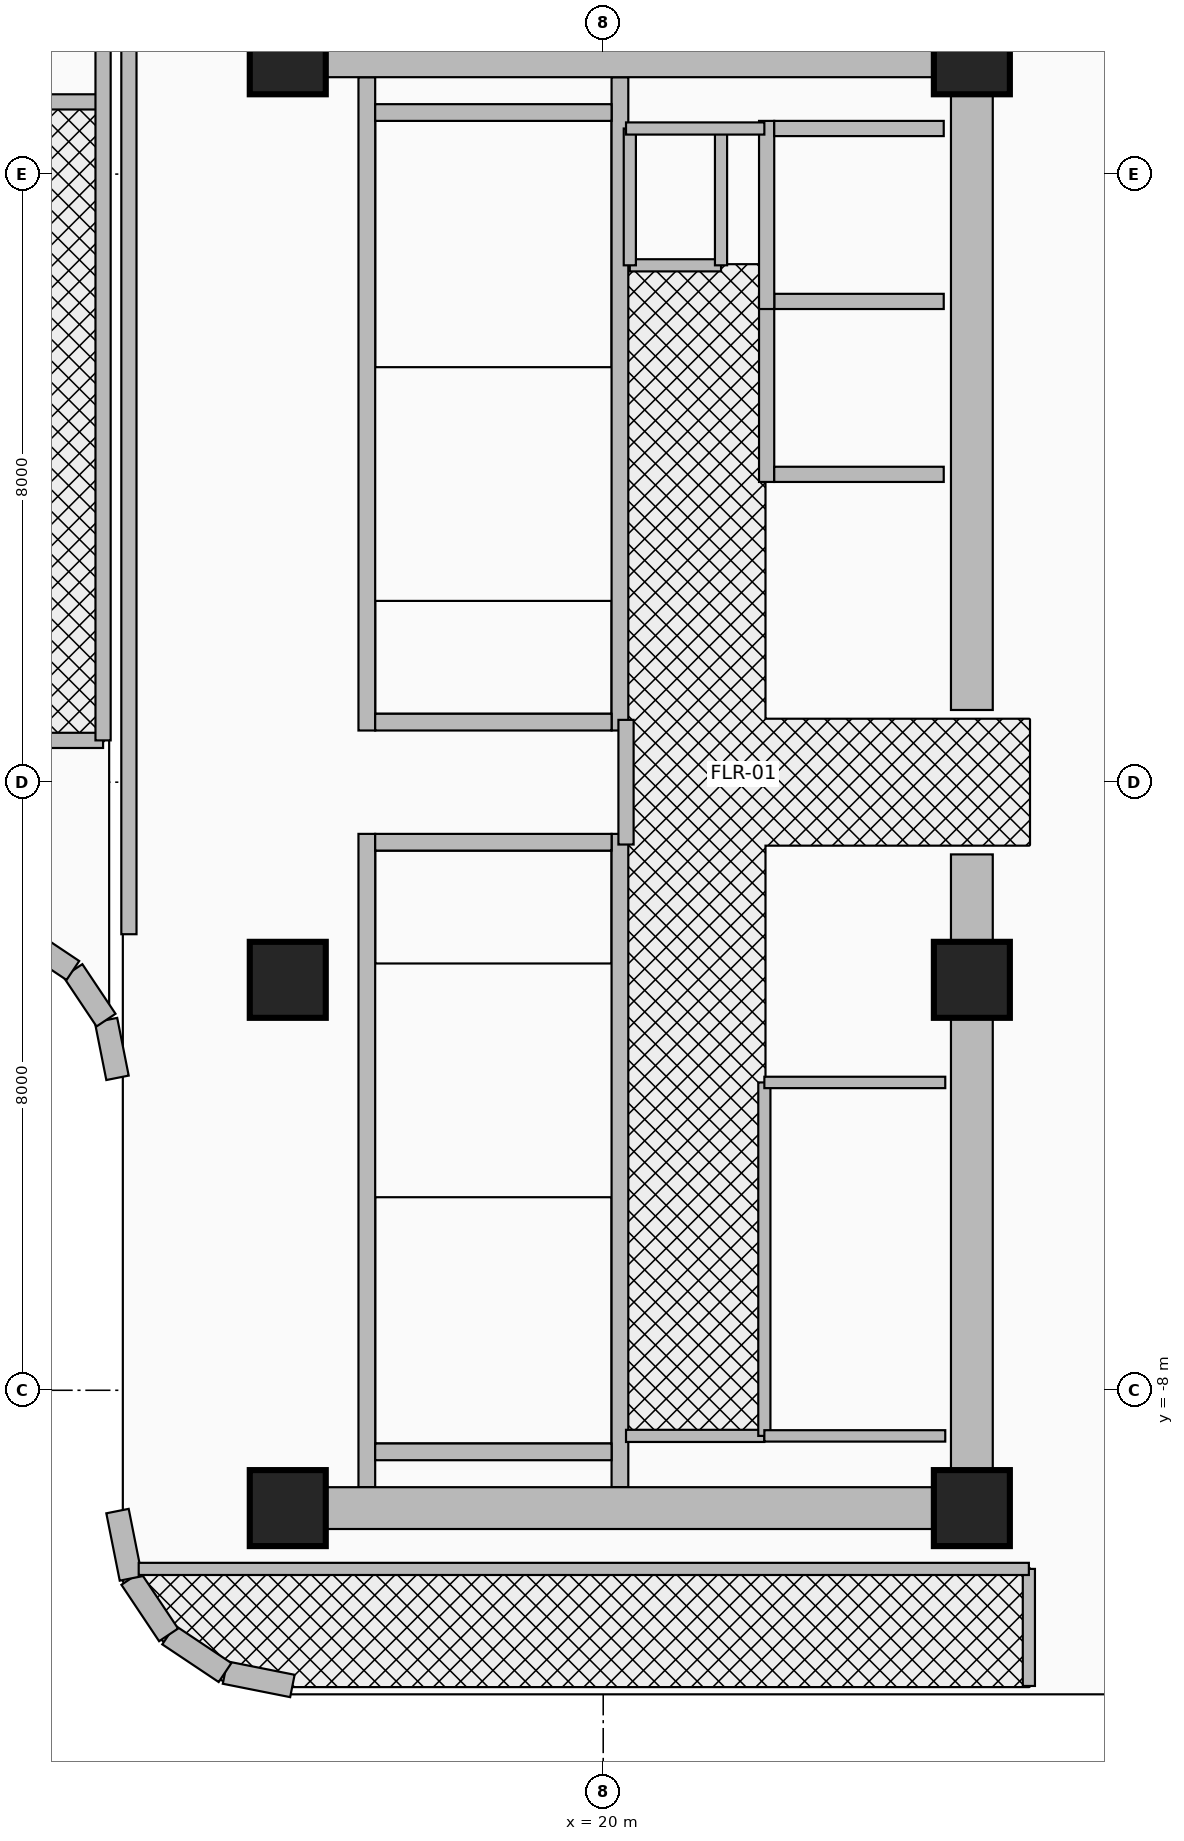
"""IFC4 building model, lengths in metres.
Left out: names, types, materials, properties, quantities, classifications, styles, units other than length and angle.
Written with IfcOpenShell. Run it as: python <this file> out.ifc"""

import sys

from ifc_helpers import new_model, si_unit, direction, frame, frame_2d, origin, origin_2d, place, context, subcontext, project, spatial, rectangle, extrude, source, transform, mapped, element, fill, save


model = new_model("IFC4")
c1 = context("Model", 3, precision=1e-05, world=origin(), true_north=direction((0.0, 1.0)))
c2 = subcontext(c1, "Body", "Model", "MODEL_VIEW")
j1 = project(units=[si_unit("LENGTHUNIT", "METRE"), si_unit("PLANEANGLEUNIT", "RADIAN")], contexts=[c1])
p1 = place(None, origin())
s1 = spatial("IfcSite", under=j1, at=p1, CompositionType="ELEMENT")
p2 = place(p1, origin())
s2 = spatial("IfcBuilding", under=s1, at=p2, CompositionType="ELEMENT")
p3 = place(p2, frame((0.0, 0.0, 172.3)))
s3 = spatial("IfcBuildingStorey", under=s2, at=p3, CompositionType="ELEMENT", Elevation=172.3)
for number, where, z_axis, x_axis in (
    (1, (16.89, 0.68, 0.0), (0.0, 0.0, 1.0), (0.0, 1.0, 0.0)),
    (2, (20.22, 0.68, 0.0), (0.0, 0.0, 1.0), (0.0, 1.0, 0.0)),
):
    element("IfcWall", number, at=place(p3, frame(where, z_axis=z_axis, x_axis=x_axis)), inside=s3, PredefinedType="SHEAR", context=c2, shape_type="SweptSolid", body=[
        extrude(rectangle(XDim=8.595, YDim=0.22, at=frame_2d((4.297, 0.0))), origin(), (0.0, 0.0, 1.0), 3.93),
    ])
p4 = place(p3, frame((17.0, 0.79, 0.0), z_axis=(0.0, 0.0, 1.0), x_axis=(1.0, 0.0, 0.0)))
e3 = element("IfcWall", 3, at=p4, inside=s3, PredefinedType="SHEAR", context=c2, shape_type="SweptSolid", body=[
    extrude(rectangle(XDim=3.11, YDim=0.22, at=frame_2d((1.555, 0.0))), origin(), (0.0, 0.0, 1.0), 3.93),
])
p5 = place(p4, frame((0.95, 0.0, 0.0)))
e4 = element("IfcOpeningElement", 4, at=p5, cuts=e3, PredefinedType="OPENING", context=c2, shape_type="SweptSolid", body=[
    extrude(rectangle(XDim=1.1, YDim=2.15, at=frame_2d((0.55, 1.075))), frame((0.0, 0.125, 0.0), z_axis=(0.0, -1.0, 0.0), x_axis=(1.0, 0.0, 0.0)), (0.0, 0.0, 1.0), 0.25),
])
p6 = place(p3, frame((17.0, 8.81, 0.0), z_axis=(0.0, 0.0, 1.0), x_axis=(1.0, 0.0, 0.0)))
e5 = element("IfcWall", 5, at=p6, inside=s3, PredefinedType="SHEAR", context=c2, shape_type="SweptSolid", body=[
    extrude(rectangle(XDim=3.11, YDim=0.22, at=frame_2d((1.555, 0.0))), origin(), (0.0, 0.0, 1.0), 3.93),
])
for number, where, z_axis, x_axis in (
    (6, (16.89, -9.275, 0.0), (0.0, 0.0, 1.0), (0.0, 1.0, 0.0)),
    (7, (20.22, -9.275, 0.0), (0.0, 0.0, 1.0), (0.0, 1.0, 0.0)),
):
    element("IfcWall", number, at=place(p3, frame(where, z_axis=z_axis, x_axis=x_axis)), inside=s3, PredefinedType="SHEAR", context=c2, shape_type="SweptSolid", body=[
        extrude(rectangle(XDim=8.595, YDim=0.22, at=frame_2d((4.297, 0.0))), origin(), (0.0, 0.0, 1.0), 3.93),
    ])
p7 = place(p3, frame((17.0, -8.81, 0.0), z_axis=(0.0, 0.0, 1.0), x_axis=(1.0, 0.0, 0.0)))
e8 = element("IfcWall", 8, at=p7, inside=s3, PredefinedType="SHEAR", context=c2, shape_type="SweptSolid", body=[
    extrude(rectangle(XDim=3.11, YDim=0.22, at=frame_2d((1.555, 0.0))), origin(), (0.0, 0.0, 1.0), 3.93),
])
p8 = place(p3, frame((17.0, -0.79, 0.0), z_axis=(0.0, 0.0, 1.0), x_axis=(1.0, 0.0, 0.0)))
e9 = element("IfcWall", 9, at=p8, inside=s3, PredefinedType="SHEAR", context=c2, shape_type="SweptSolid", body=[
    extrude(rectangle(XDim=3.11, YDim=0.22, at=frame_2d((1.555, 0.0))), origin(), (0.0, 0.0, 1.0), 3.93),
])
p9 = place(p8, frame((0.95, 0.0, 0.0)))
e10 = element("IfcOpeningElement", 10, at=p9, cuts=e9, PredefinedType="OPENING", context=c2, shape_type="SweptSolid", body=[
    extrude(rectangle(XDim=1.1, YDim=2.15, at=frame_2d((0.55, 1.075))), frame((0.0, 0.125, 0.0), z_axis=(0.0, -1.0, 0.0), x_axis=(1.0, 0.0, 0.0)), (0.0, 0.0, 1.0), 0.25),
])
for number, where, z_axis, x_axis in (
    (11, (24.85, -9.825, 0.0), (0.0, 0.0, 1.0), (0.0, 1.0, 0.0)),
    (12, (24.85, 0.95, 0.0), (0.0, 0.0, 1.0), (0.0, 1.0, 0.0)),
):
    element("IfcWall", number, at=place(p3, frame(where, z_axis=z_axis, x_axis=x_axis)), inside=s3, PredefinedType="SHEAR", context=c2, shape_type="SweptSolid", body=[
        extrude(rectangle(XDim=8.875, YDim=0.55, at=frame_2d((4.438, 0.0))), origin(), (0.0, 0.0, 1.0), 3.93),
    ])
for number, where, z_axis, x_axis in (
    (13, (15.85, 9.55, 0.0), (0.0, 0.0, 1.0), (1.0, 0.0, 0.0)),
    (14, (15.85, -9.55, 0.0), (0.0, 0.0, 1.0), (1.0, 0.0, 0.0)),
):
    element("IfcWall", number, at=place(p3, frame(where, z_axis=z_axis, x_axis=x_axis)), inside=s3, PredefinedType="SHEAR", context=c2, shape_type="SweptSolid", body=[
        extrude(rectangle(XDim=9.0, YDim=0.55, at=frame_2d((4.5, 0.0))), origin(), (0.0, 0.0, 1.0), 3.93),
    ])
m1 = source(origin(), c2, "Body", "SweptSolid", [
    extrude(rectangle(XDim=1.0, YDim=1.0, at=origin_2d()), origin(), (0.0, 0.0, 1.0), 4.25),
])
for number, where, z_axis, x_axis in (
    (15, (15.85, -9.55, 0.0), (0.0, 0.0, 1.0), (1.0, 0.0, 0.0)),
    (16, (24.85, -9.55, 0.0), (0.0, 0.0, 1.0), (1.0, 0.0, 0.0)),
    (17, (15.85, -2.6, 0.0), (0.0, 0.0, 1.0), (1.0, 0.0, 0.0)),
    (18, (24.85, -2.6, 0.0), (0.0, 0.0, 1.0), (1.0, 0.0, 0.0)),
    (19, (15.85, 9.55, 0.0), (0.0, 0.0, 1.0), (1.0, 0.0, 0.0)),
    (20, (24.85, 9.55, 0.0), (0.0, 0.0, 1.0), (1.0, 0.0, 0.0)),
):
    element("IfcColumn", number, at=place(p3, frame(where, z_axis=z_axis, x_axis=x_axis)), inside=s3, PredefinedType="COLUMN", context=c2, shape_type="MappedRepresentation", body=[
        mapped(m1, transform((0.0, 0.0, 0.0), x_axis=(1.0, 0.0, 0.0), y_axis=(0.0, 1.0, 0.0), z_axis=(0.0, 0.0, 1.0), scale=1.0)),
    ])
p10 = place(p3, frame((15.911, -11.89, 0.0), z_axis=(0.0, 0.0, 1.0), x_axis=(-0.980798241101, 0.195025152871, 0.0)))
e21 = element("IfcWall", 21, at=p10, inside=s3, PredefinedType="SOLIDWALL", context=c2, shape_type="SweptSolid", body=[
    extrude(rectangle(XDim=0.904, YDim=0.3, at=frame_2d((0.452, 0.0))), origin(), (0.0, 0.0, 1.0), 3.93),
])
for number, where, z_axis, x_axis in (
    (22, (15.024, -11.714, 0.0), (0.0, 0.0, 1.0), (-0.832, 0.556, 0.0)),
    (23, (14.282, -11.218, 0.0), (0.0, 0.0, 1.0), (-0.556, 0.832, 0.0)),
):
    element("IfcWall", number, at=place(p3, frame(where, z_axis=z_axis, x_axis=x_axis)), inside=s3, PredefinedType="SOLIDWALL", context=c2, shape_type="SweptSolid", body=[
        extrude(rectangle(XDim=0.893, YDim=0.3, at=frame_2d((0.446, 0.0))), origin(), (0.0, 0.0, 1.0), 3.93),
    ])
p11 = place(p3, frame((13.786, -10.476, 0.0), z_axis=(0.0, 0.0, 1.0), x_axis=(-0.195025152871, 0.980798241101, 0.0)))
e24 = element("IfcWall", 24, at=p11, inside=s3, PredefinedType="SOLIDWALL", context=c2, shape_type="SweptSolid", body=[
    extrude(rectangle(XDim=0.904, YDim=0.3, at=frame_2d((0.452, 0.0))), origin(), (0.0, 0.0, 1.0), 3.93),
])
p12 = place(p3, frame((13.61, -3.889, 0.0), z_axis=(0.0, 0.0, 1.0), x_axis=(-0.195206365311, 0.98076219082, 0.0)))
e25 = element("IfcWall", 25, at=p12, inside=s3, PredefinedType="SOLIDWALL", context=c2, shape_type="SweptSolid", body=[
    extrude(rectangle(XDim=0.774, YDim=0.3, at=frame_2d((0.387, 0.0))), origin(), (0.0, 0.0, 1.0), 3.93),
])
p13 = place(p3, frame((13.459, -3.13, 0.0), z_axis=(0.0, 0.0, 1.0), x_axis=(-0.555776307766, 0.831331880615, 0.0)))
e26 = element("IfcWall", 26, at=p13, inside=s3, PredefinedType="SOLIDWALL", context=c2, shape_type="SweptSolid", body=[
    extrude(rectangle(XDim=0.785, YDim=0.3, at=frame_2d((0.393, 0.0))), origin(), (0.0, 0.0, 1.0), 3.93),
])
p14 = place(p3, frame((13.023, -2.477, 0.0), z_axis=(0.0, 0.0, 1.0), x_axis=(-0.831331880615, 0.555776307766, 0.0)))
e27 = element("IfcWall", 27, at=p14, inside=s3, PredefinedType="SOLIDWALL", context=c2, shape_type="SweptSolid", body=[
    extrude(rectangle(XDim=0.785, YDim=0.3, at=frame_2d((0.393, 0.0))), origin(), (0.0, 0.0, 1.0), 2.715),
])
p15 = place(p3, frame((22.15, 3.95, 0.0), z_axis=(0.0, 0.0, 1.0), x_axis=(0.0, 1.0, 0.0)))
e28 = element("IfcWall", 28, at=p15, inside=s3, PredefinedType="MOVABLE", context=c2, shape_type="SweptSolid", body=[
    extrude(rectangle(XDim=2.475, YDim=0.2, at=frame_2d((1.238, 0.0))), origin(), (0.0, 0.0, 1.0), 3.93),
])
p16 = place(p15, frame((0.688, 0.0, 0.0)))
e29 = element("IfcOpeningElement", 29, at=p16, cuts=e28, PredefinedType="OPENING", context=c2, shape_type="SweptSolid", body=[
    extrude(rectangle(XDim=1.1, YDim=2.1, at=frame_2d((0.55, 1.05))), frame((0.0, 0.115, 0.0), z_axis=(0.0, -1.0, 0.0), x_axis=(1.0, 0.0, 0.0)), (0.0, 0.0, 1.0), 0.23),
])
for number, where, z_axis, x_axis in (
    (30, (22.25, 4.05, 0.0), (0.0, 0.0, 1.0), (1.0, 0.0, 0.0)),
    (31, (22.25, 6.325, 0.0), (0.0, 0.0, 1.0), (1.0, 0.0, 0.0)),
):
    element("IfcWall", number, at=place(p3, frame(where, z_axis=z_axis, x_axis=x_axis)), inside=s3, PredefinedType="MOVABLE", context=c2, shape_type="SweptSolid", body=[
        extrude(rectangle(XDim=2.23, YDim=0.2, at=frame_2d((1.115, 0.0))), origin(), (0.0, 0.0, 1.0), 3.93),
    ])
p17 = place(p3, frame((22.15, 6.225, 0.0), z_axis=(0.0, 0.0, 1.0), x_axis=(0.0, 1.0, 0.0)))
e32 = element("IfcWall", 32, at=p17, inside=s3, PredefinedType="MOVABLE", context=c2, shape_type="SweptSolid", body=[
    extrude(rectangle(XDim=2.475, YDim=0.2, at=frame_2d((1.237, 0.0))), origin(), (0.0, 0.0, 1.0), 3.93),
])
p18 = place(p17, frame((0.688, 0.0, 0.0)))
e33 = element("IfcOpeningElement", 33, at=p18, cuts=e32, PredefinedType="OPENING", context=c2, shape_type="SweptSolid", body=[
    extrude(rectangle(XDim=1.1, YDim=2.1, at=frame_2d((0.55, 1.05))), frame((0.0, 0.115, 0.0), z_axis=(0.0, -1.0, 0.0), x_axis=(1.0, 0.0, 0.0)), (0.0, 0.0, 1.0), 0.23),
])
p19 = place(p3, frame((22.25, 8.6, 0.0), z_axis=(0.0, 0.0, 1.0), x_axis=(1.0, 0.0, 0.0)))
e34 = element("IfcWall", 34, at=p19, inside=s3, PredefinedType="MOVABLE", context=c2, shape_type="SweptSolid", body=[
    extrude(rectangle(XDim=2.23, YDim=0.2, at=frame_2d((1.115, 0.0))), origin(), (0.0, 0.0, 1.0), 3.93),
])
p20 = place(p3, frame((20.3, -0.82, 0.0), z_axis=(0.0, 0.0, 1.0), x_axis=(0.0, 1.0, 0.0)))
e35 = element("IfcWall", 35, at=p20, inside=s3, PredefinedType="PARTITIONING", context=c2, shape_type="SweptSolid", body=[
    extrude(rectangle(XDim=1.64, YDim=0.2, at=frame_2d((0.82, 0.0))), origin(), (0.0, 0.0, 1.0), 3.93),
])
p21 = place(p20, frame((0.295, 0.0, 0.0)))
e36 = element("IfcOpeningElement", 36, at=p21, cuts=e35, PredefinedType="OPENING", context=c2, shape_type="SweptSolid", body=[
    extrude(rectangle(XDim=1.05, YDim=2.15, at=frame_2d((0.525, 1.075))), frame((0.0, 0.115, 0.0), z_axis=(0.0, -1.0, 0.0), x_axis=(1.0, 0.0, 0.0)), (0.0, 0.0, 1.0), 0.23),
])
p22 = place(p3, frame((20.35, 6.8, 0.0), z_axis=(0.0, 0.0, 1.0), x_axis=(1.0, 0.0, 0.0)))
e37 = element("IfcWall", 37, at=p22, inside=s3, PredefinedType="PARTITIONING", context=c2, shape_type="SweptSolid", body=[
    extrude(rectangle(XDim=1.2, YDim=0.16, at=frame_2d((0.6, 0.0))), origin(), (0.0, 0.0, 1.0), 3.93),
])
p23 = place(p22, frame((0.175, 0.0, 0.0)))
e38 = element("IfcOpeningElement", 38, at=p23, cuts=e37, PredefinedType="OPENING", context=c2, shape_type="SweptSolid", body=[
    extrude(rectangle(XDim=0.85, YDim=2.05, at=frame_2d((0.425, 1.025))), frame((0.0, 0.095, 0.0), z_axis=(0.0, -1.0, 0.0), x_axis=(1.0, 0.0, 0.0)), (0.0, 0.0, 1.0), 0.19),
])
for number, where, z_axis, x_axis in (
    (39, (21.55, 6.8, 0.0), (0.0, 0.0, 1.0), (0.0, 1.0, 0.0)),
    (40, (20.35, 6.8, 0.0), (0.0, 0.0, 1.0), (0.0, 1.0, 0.0)),
):
    element("IfcWall", number, at=place(p3, frame(where, z_axis=z_axis, x_axis=x_axis)), inside=s3, PredefinedType="PARTITIONING", context=c2, shape_type="SweptSolid", body=[
        extrude(rectangle(XDim=1.8, YDim=0.16, at=frame_2d((0.9, 0.0))), origin(), (0.0, 0.0, 1.0), 3.93),
    ])
for number, where, z_axis, x_axis in (
    (41, (20.3, -8.6, 0.0), (0.0, 0.0, 1.0), (1.0, 0.0, 0.0)),
    (42, (20.3, 8.6, 0.0), (0.0, 0.0, 1.0), (1.0, 0.0, 0.0)),
):
    element("IfcWall", number, at=place(p3, frame(where, z_axis=z_axis, x_axis=x_axis)), inside=s3, PredefinedType="PARTITIONING", context=c2, shape_type="SweptSolid", body=[
        extrude(rectangle(XDim=1.82, YDim=0.16, at=frame_2d((0.91, 0.0))), origin(), (0.0, 0.0, 1.0), 3.93),
    ])
p24 = place(p3, frame((22.12, -8.6, 0.0), z_axis=(0.0, 0.0, 1.0), x_axis=(0.0, 1.0, 0.0)))
e43 = element("IfcWall", 43, at=p24, inside=s3, PredefinedType="PARTITIONING", context=c2, shape_type="SweptSolid", body=[
    extrude(rectangle(XDim=4.65, YDim=0.16, at=frame_2d((2.325, 0.0))), origin(), (0.0, 0.0, 1.0), 3.93),
])
p25 = place(p24, frame((1.8, 0.0, 0.0)))
e44 = element("IfcOpeningElement", 44, at=p25, cuts=e43, PredefinedType="OPENING", context=c2, shape_type="SweptSolid", body=[
    extrude(rectangle(XDim=0.95, YDim=2.15, at=frame_2d((0.475, 1.075))), frame((0.0, 0.095, 0.0), z_axis=(0.0, -1.0, 0.0), x_axis=(1.0, 0.0, 0.0)), (0.0, 0.0, 1.0), 0.19),
])
for number, where, z_axis, x_axis in (
    (45, (22.12, -3.95, 0.0), (0.0, 0.0, 1.0), (1.0, 0.0, 0.0)),
    (46, (22.12, -8.6, 0.0), (0.0, 0.0, 1.0), (1.0, 0.0, 0.0)),
):
    element("IfcWall", number, at=place(p3, frame(where, z_axis=z_axis, x_axis=x_axis)), inside=s3, PredefinedType="PARTITIONING", context=c2, shape_type="SweptSolid", body=[
        extrude(rectangle(XDim=2.38, YDim=0.15, at=frame_2d((1.19, 0.0))), origin(), (0.0, 0.0, 1.0), 3.93),
    ])
p26 = place(p3, frame((-11.55, 0.55, 0.0), z_axis=(0.0, 0.0, 1.0), x_axis=(1.0, 0.0, 0.0)))
e47 = element("IfcWall", 47, at=p26, inside=s3, PredefinedType="PARTITIONING", context=c2, shape_type="SweptSolid", body=[
    extrude(rectangle(XDim=24.97, YDim=0.2, at=frame_2d((12.485, 0.0))), origin(), (0.0, 0.0, 1.0), 2.715),
])
p27 = place(p3, frame((7.6, 8.95, 0.0), z_axis=(0.0, 0.0, 1.0), x_axis=(1.0, 0.0, 0.0)))
e48 = element("IfcWall", 48, at=p27, inside=s3, PredefinedType="PARTITIONING", context=c2, shape_type="SweptSolid", body=[
    extrude(rectangle(XDim=5.82, YDim=0.2, at=frame_2d((2.91, 0.0))), origin(), (0.0, 0.0, 1.0), 2.715),
])
p28 = place(p3, frame((13.42, 0.55, 0.0), z_axis=(0.0, 0.0, 1.0), x_axis=(0.0, 1.0, 0.0)))
e49 = element("IfcWall", 49, at=p28, inside=s3, PredefinedType="PARTITIONING", context=c2, shape_type="SweptSolid", body=[
    extrude(rectangle(XDim=10.87, YDim=0.2, at=frame_2d((5.435, 0.0))), origin(), (0.0, 0.0, 1.0), 2.715),
])
p29 = place(p3, frame((13.76, -2.0, 0.0), z_axis=(0.0, 0.0, 1.0), x_axis=(0.0, 1.0, 0.0)))
e50 = element("IfcWall", 50, at=p29, inside=s3, PredefinedType="PARTITIONING", context=c2, shape_type="SweptSolid", body=[
    extrude(rectangle(XDim=13.42, YDim=0.2, at=frame_2d((6.71, 0.0))), origin(), (0.0, 0.0, 1.0), 2.715),
])
p30 = place(p3, frame((25.6, -11.89, 0.0), z_axis=(0.0, 0.0, 1.0), x_axis=(0.0, 1.0, 0.0)))
e51 = element("IfcWall", 51, at=p30, inside=s3, PredefinedType="PARTITIONING", context=c2, shape_type="SweptSolid", body=[
    extrude(rectangle(XDim=1.54, YDim=0.16, at=frame_2d((0.77, 0.0))), origin(), (0.0, 0.0, 1.0), 3.93),
])
p31 = place(p30, frame((0.32, 0.0, 0.0)))
e52 = element("IfcOpeningElement", 52, at=p31, cuts=e51, PredefinedType="OPENING", context=c2, shape_type="SweptSolid", body=[
    extrude(rectangle(XDim=0.9, YDim=2.1, at=frame_2d((0.45, 1.05))), frame((0.0, 0.095, 0.0), z_axis=(0.0, -1.0, 0.0), x_axis=(1.0, 0.0, 0.0)), (0.0, 0.0, 1.0), 0.19),
])
p32 = place(p3, frame((13.889, -10.35, 0.0), z_axis=(0.0, 0.0, 1.0), x_axis=(1.0, 0.0, 0.0)))
e53 = element("IfcWall", 53, at=p32, inside=s3, PredefinedType="PARTITIONING", context=c2, shape_type="SweptSolid", body=[
    extrude(rectangle(XDim=11.711, YDim=0.16, at=frame_2d((5.855, 0.0))), origin(), (0.0, 0.0, 1.0), 3.93),
])
p33 = place(p16, origin())
e54 = element("IfcDoor", 54, at=p33, inside=s3, OperationType="DOUBLE_DOOR_SLIDING", PredefinedType="DOOR", context=c2, shape_type="SweptSolid", body=[
    extrude(rectangle(XDim=1.1, YDim=2.1, at=frame_2d((0.55, 1.05))), frame((0.0, 0.025, 0.0), z_axis=(0.0, -1.0, 0.0), x_axis=(1.0, 0.0, 0.0)), (0.0, 0.0, 1.0), 0.05),
])
fill(e29, e54)
p34 = place(p18, origin())
e55 = element("IfcDoor", 55, at=p34, inside=s3, OperationType="DOUBLE_DOOR_SLIDING", PredefinedType="DOOR", context=c2, shape_type="SweptSolid", body=[
    extrude(rectangle(XDim=1.1, YDim=2.1, at=frame_2d((0.55, 1.05))), frame((0.0, 0.025, 0.0), z_axis=(0.0, -1.0, 0.0), x_axis=(1.0, 0.0, 0.0)), (0.0, 0.0, 1.0), 0.05),
])
fill(e33, e55)
p35 = place(p21, frame((1.05, 0.0, 0.0), z_axis=(0.0, 0.0, 1.0), x_axis=(-1.0, 0.0, 0.0)))
e56 = element("IfcDoor", 56, at=p35, inside=s3, OperationType="SINGLE_SWING_LEFT", PredefinedType="DOOR", context=c2, shape_type="SweptSolid", body=[
    extrude(rectangle(XDim=1.05, YDim=2.15, at=frame_2d((0.525, 1.075))), frame((0.0, 0.025, 0.0), z_axis=(0.0, -1.0, 0.0), x_axis=(1.0, 0.0, 0.0)), (0.0, 0.0, 1.0), 0.05),
])
fill(e36, e56)
p36 = place(p5, origin())
e57 = element("IfcDoor", 57, at=p36, inside=s3, OperationType="SINGLE_SWING_RIGHT", PredefinedType="DOOR", context=c2, shape_type="SweptSolid", body=[
    extrude(rectangle(XDim=1.1, YDim=2.15, at=frame_2d((0.55, 1.075))), frame((0.0, 0.025, 0.0), z_axis=(0.0, -1.0, 0.0), x_axis=(1.0, 0.0, 0.0)), (0.0, 0.0, 1.0), 0.05),
])
fill(e4, e57)
p37 = place(p9, frame((1.1, 0.0, 0.0), z_axis=(0.0, 0.0, 1.0), x_axis=(-1.0, 0.0, 0.0)))
e58 = element("IfcDoor", 58, at=p37, inside=s3, OperationType="SINGLE_SWING_LEFT", PredefinedType="DOOR", context=c2, shape_type="SweptSolid", body=[
    extrude(rectangle(XDim=1.1, YDim=2.15, at=frame_2d((0.55, 1.075))), frame((0.0, 0.025, 0.0), z_axis=(0.0, -1.0, 0.0), x_axis=(1.0, 0.0, 0.0)), (0.0, 0.0, 1.0), 0.05),
])
fill(e10, e58)
p38 = place(p23, origin())
e59 = element("IfcDoor", 59, at=p38, inside=s3, OperationType="SINGLE_SWING_RIGHT", PredefinedType="DOOR", context=c2, shape_type="SweptSolid", body=[
    extrude(rectangle(XDim=0.85, YDim=2.05, at=frame_2d((0.425, 1.025))), frame((0.0, 0.025, 0.0), z_axis=(0.0, -1.0, 0.0), x_axis=(1.0, 0.0, 0.0)), (0.0, 0.0, 1.0), 0.05),
])
fill(e38, e59)
p39 = place(p25, origin())
e60 = element("IfcDoor", 60, at=p39, inside=s3, OperationType="SINGLE_SWING_LEFT", PredefinedType="DOOR", context=c2, shape_type="SweptSolid", body=[
    extrude(rectangle(XDim=0.95, YDim=2.15, at=frame_2d((0.475, 1.075))), frame((0.0, 0.025, 0.0), z_axis=(0.0, -1.0, 0.0), x_axis=(1.0, 0.0, 0.0)), (0.0, 0.0, 1.0), 0.05),
])
fill(e44, e60)
p40 = place(p31, frame((0.9, 0.0, 0.0), z_axis=(0.0, 0.0, 1.0), x_axis=(-1.0, 0.0, 0.0)))
e61 = element("IfcDoor", 61, at=p40, inside=s3, OperationType="SINGLE_SWING_LEFT", PredefinedType="DOOR", context=c2, shape_type="SweptSolid", body=[
    extrude(rectangle(XDim=0.9, YDim=2.1, at=frame_2d((0.45, 1.05))), frame((0.0, 0.025, 0.0), z_axis=(0.0, -1.0, 0.0), x_axis=(1.0, 0.0, 0.0)), (0.0, 0.0, 1.0), 0.05),
])
fill(e52, e61)
save(model, sys.argv[1])
